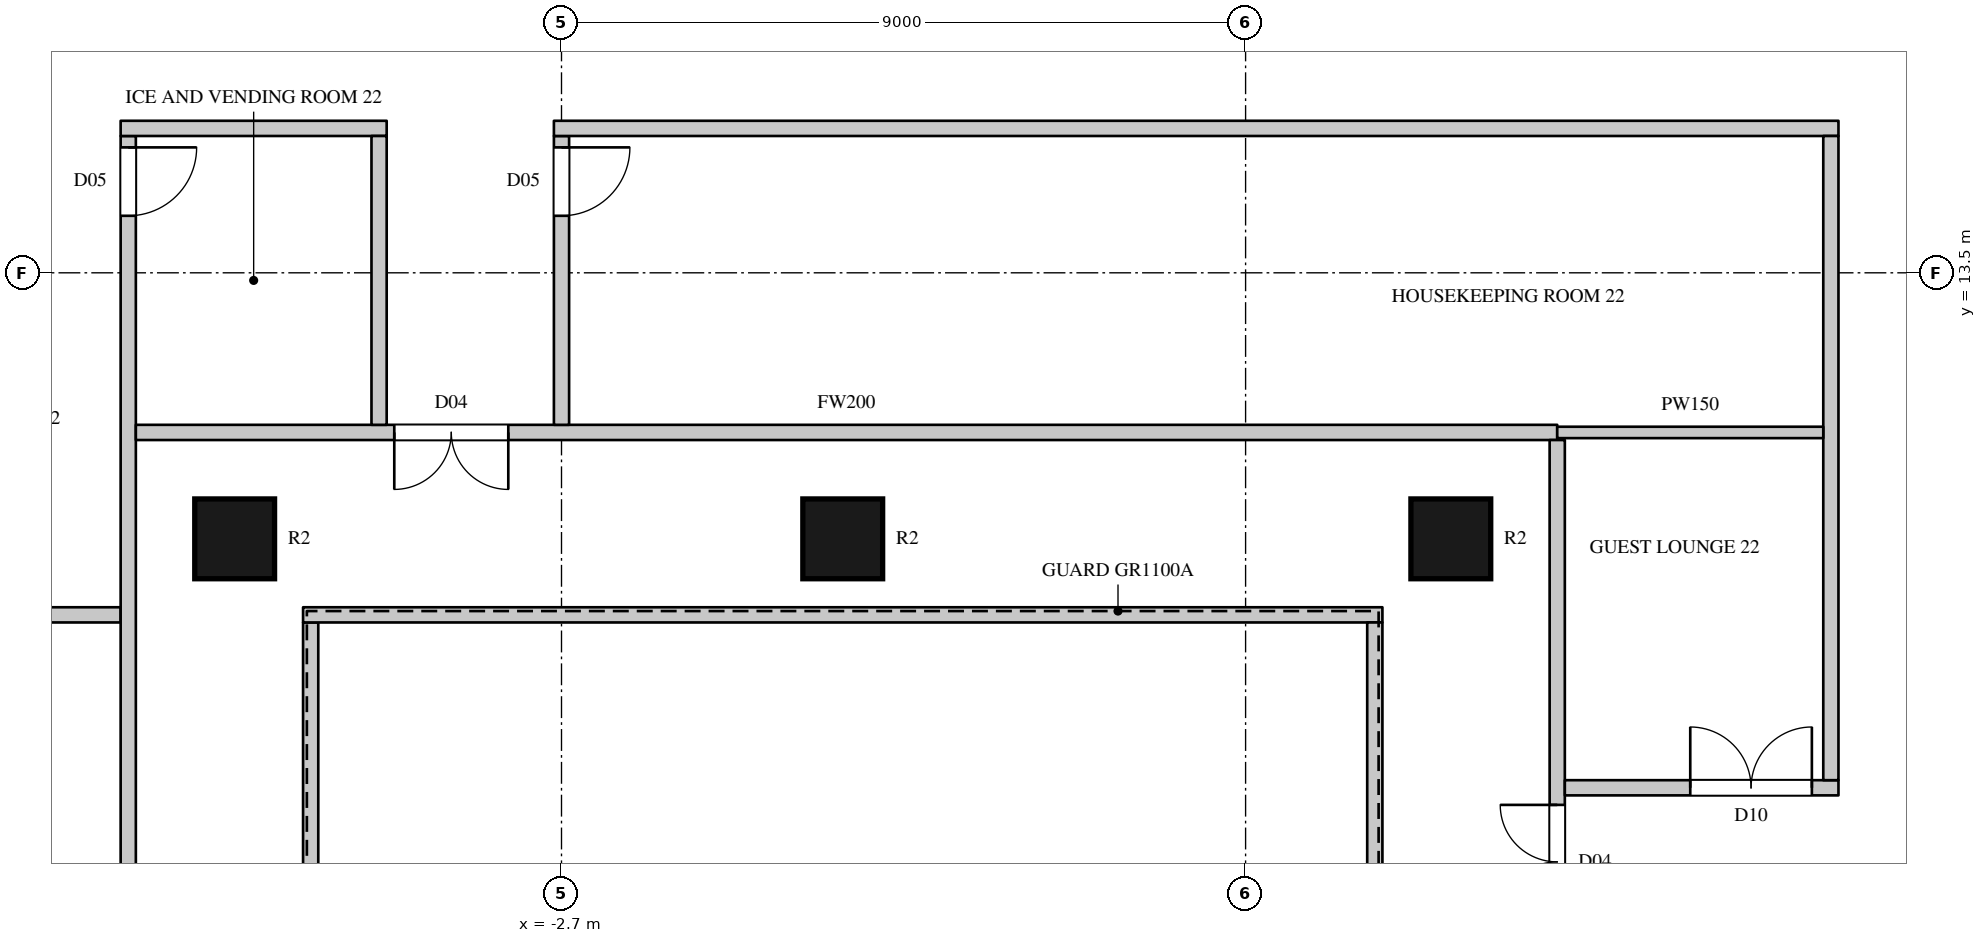
"""IFC4 building model, lengths in metres.
Left out: names, types, materials, properties, quantities, classifications, styles, units other than length and angle.
Written with IfcOpenShell. Run it as: python <this file> out.ifc"""

import sys

from ifc_helpers import new_model, si_unit, direction, frame, frame_2d, origin, origin_2d, place, context, subcontext, project, spatial, rectangle, circle, extrude, element, fill, save


model = new_model("IFC4")
c1 = context("Model", 3, precision=1e-05, world=origin(), true_north=direction((0.0, 1.0)))
c2 = subcontext(c1, "Body", "Model", "MODEL_VIEW")
j1 = project(units=[si_unit("LENGTHUNIT", "METRE"), si_unit("PLANEANGLEUNIT", "RADIAN")], contexts=[c1])
p1 = place(None, origin())
s1 = spatial("IfcSite", under=j1, at=p1, CompositionType="ELEMENT")
p2 = place(p1, origin())
s2 = spatial("IfcBuilding", under=s1, at=p2, CompositionType="ELEMENT")
p3 = place(p2, frame((0.0, 0.0, 109.5)))
s3 = spatial("IfcBuildingStorey", under=s2, at=p3, CompositionType="ELEMENT", Elevation=109.5)
for number, where, z_axis, x_axis in (
    (1, (-7.0, 10.0, 0.0), (0.0, 0.0, 1.0), (1.0, 0.0, 0.0)),
    (2, (1.0, 10.0, 0.0), (0.0, 0.0, 1.0), (1.0, 0.0, 0.0)),
    (3, (9.0, 10.0, 0.0), (0.0, 0.0, 1.0), (1.0, 0.0, 0.0)),
):
    element("IfcColumn", number, at=place(p3, frame(where, z_axis=z_axis, x_axis=x_axis)), inside=s3, PredefinedType="COLUMN", context=c2, shape_type="SweptSolid", body=[
        extrude(circle(Radius=0.525, at=origin_2d()), origin(), (0.0, 0.0, 1.0), 3.6),
    ])
p4 = place(p3, frame((-13.97, 9.0, 0.0), z_axis=(0.0, 0.0, 1.0), x_axis=(1.0, 0.0, 0.0)))
e4 = element("IfcWall", 4, at=p4, inside=s3, PredefinedType="PARTITIONING", context=c2, shape_type="SweptSolid", body=[
    extrude(rectangle(XDim=5.47, YDim=0.2, at=frame_2d((2.735, 0.0))), origin(), (0.0, 0.0, 1.0), 3.3),
])
p5 = place(p3, frame((-8.4, -11.3, 0.0), z_axis=(0.0, 0.0, 1.0), x_axis=(0.0, 1.0, 0.0)))
e5 = element("IfcWall", 5, at=p5, inside=s3, PredefinedType="PARTITIONING", context=c2, shape_type="SweptSolid", body=[
    extrude(rectangle(XDim=26.6, YDim=0.2, at=frame_2d((13.3, 0.0))), origin(), (0.0, 0.0, 1.0), 3.3),
])
p6 = place(p5, frame((15.05, 0.0, 0.0)))
e6 = element("IfcOpeningElement", 6, at=p6, cuts=e5, PredefinedType="OPENING", context=c2, shape_type="SweptSolid", body=[
    extrude(rectangle(XDim=1.5, YDim=2.2, at=frame_2d((0.75, 1.1))), frame((0.0, 0.11, 0.0), z_axis=(0.0, -1.0, 0.0), x_axis=(1.0, 0.0, 0.0)), (0.0, 0.0, 1.0), 0.22),
])
p7 = place(p5, frame((25.55, 0.0, 0.0)))
e7 = element("IfcOpeningElement", 7, at=p7, cuts=e5, PredefinedType="OPENING", context=c2, shape_type="SweptSolid", body=[
    extrude(rectangle(XDim=0.9, YDim=2.2, at=frame_2d((0.45, 1.1))), frame((0.0, 0.11, 0.0), z_axis=(0.0, -1.0, 0.0), x_axis=(1.0, 0.0, 0.0)), (0.0, 0.0, 1.0), 0.22),
])
p8 = place(p3, frame((-8.3, 11.4, 0.0), z_axis=(0.0, 0.0, 1.0), x_axis=(1.0, 0.0, 0.0)))
e8 = element("IfcWall", 8, at=p8, inside=s3, PredefinedType="PARTITIONING", context=c2, shape_type="SweptSolid", body=[
    extrude(rectangle(XDim=18.7, YDim=0.2, at=frame_2d((9.35, 0.0))), origin(), (0.0, 0.0, 1.0), 3.3),
])
p9 = place(p8, frame((3.4, 0.0, 0.0)))
e9 = element("IfcOpeningElement", 9, at=p9, cuts=e8, PredefinedType="OPENING", context=c2, shape_type="SweptSolid", body=[
    extrude(rectangle(XDim=1.5, YDim=2.2, at=frame_2d((0.75, 1.1))), frame((0.0, 0.11, 0.0), z_axis=(0.0, -1.0, 0.0), x_axis=(1.0, 0.0, 0.0)), (0.0, 0.0, 1.0), 0.22),
])
p10 = place(p3, frame((-8.5, 15.4, 0.0), z_axis=(0.0, 0.0, 1.0), x_axis=(1.0, 0.0, 0.0)))
e10 = element("IfcWall", 10, at=p10, inside=s3, PredefinedType="PARTITIONING", context=c2, shape_type="SweptSolid", body=[
    extrude(rectangle(XDim=3.5, YDim=0.2, at=frame_2d((1.75, 0.0))), origin(), (0.0, 0.0, 1.0), 3.3),
])
p11 = place(p3, frame((-6.0, -8.9, 0.0), z_axis=(0.0, 0.0, 1.0), x_axis=(0.0, 1.0, 0.0)))
e11 = element("IfcWall", 11, at=p11, inside=s3, PredefinedType="PARTITIONING", context=c2, shape_type="SweptSolid", body=[
    extrude(rectangle(XDim=17.8, YDim=0.2, at=frame_2d((8.9, 0.0))), origin(), (0.0, 0.0, 1.0), 3.3),
])
p12 = place(p3, frame((-6.1, 9.0, 0.0), z_axis=(0.0, 0.0, 1.0), x_axis=(1.0, 0.0, 0.0)))
e12 = element("IfcWall", 12, at=p12, inside=s3, PredefinedType="PARTITIONING", context=c2, shape_type="SweptSolid", body=[
    extrude(rectangle(XDim=14.2, YDim=0.2, at=frame_2d((7.1, 0.0))), origin(), (0.0, 0.0, 1.0), 3.3),
])
p13 = place(p3, frame((-5.1, 11.5, 0.0), z_axis=(0.0, 0.0, 1.0), x_axis=(0.0, 1.0, 0.0)))
e13 = element("IfcWall", 13, at=p13, inside=s3, PredefinedType="PARTITIONING", context=c2, shape_type="SweptSolid", body=[
    extrude(rectangle(XDim=3.8, YDim=0.2, at=frame_2d((1.9, 0.0))), origin(), (0.0, 0.0, 1.0), 3.3),
])
p14 = place(p3, frame((-2.7, 11.5, 0.0), z_axis=(0.0, 0.0, 1.0), x_axis=(0.0, 1.0, 0.0)))
e14 = element("IfcWall", 14, at=p14, inside=s3, PredefinedType="PARTITIONING", context=c2, shape_type="SweptSolid", body=[
    extrude(rectangle(XDim=3.8, YDim=0.2, at=frame_2d((1.9, 0.0))), origin(), (0.0, 0.0, 1.0), 2.75),
])
p15 = place(p14, frame((2.75, 0.0, 0.0)))
e15 = element("IfcOpeningElement", 15, at=p15, cuts=e14, PredefinedType="OPENING", context=c2, shape_type="SweptSolid", body=[
    extrude(rectangle(XDim=0.9, YDim=2.2, at=frame_2d((0.45, 1.1))), frame((0.0, 0.11, 0.0), z_axis=(0.0, -1.0, 0.0), x_axis=(1.0, 0.0, 0.0)), (0.0, 0.0, 1.0), 0.22),
])
p16 = place(p3, frame((-2.8, 15.4, 0.0), z_axis=(0.0, 0.0, 1.0), x_axis=(1.0, 0.0, 0.0)))
e16 = element("IfcWall", 16, at=p16, inside=s3, PredefinedType="PARTITIONING", context=c2, shape_type="SweptSolid", body=[
    extrude(rectangle(XDim=16.9, YDim=0.2, at=frame_2d((8.45, 0.0))), origin(), (0.0, 0.0, 1.0), 3.3),
])
p17 = place(p3, frame((8.0, -8.9, 0.0), z_axis=(0.0, 0.0, 1.0), x_axis=(0.0, 1.0, 0.0)))
e17 = element("IfcWall", 17, at=p17, inside=s3, PredefinedType="PARTITIONING", context=c2, shape_type="SweptSolid", body=[
    extrude(rectangle(XDim=17.8, YDim=0.2, at=frame_2d((8.9, 0.0))), origin(), (0.0, 0.0, 1.0), 3.3),
])
p18 = place(p3, frame((10.4, -11.3, 0.0), z_axis=(0.0, 0.0, 1.0), x_axis=(0.0, 1.0, 0.0)))
e18 = element("IfcWall", 18, at=p18, inside=s3, PredefinedType="PARTITIONING", context=c2, shape_type="SweptSolid", body=[
    extrude(rectangle(XDim=22.6, YDim=0.2, at=frame_2d((11.3, 0.0))), origin(), (0.0, 0.0, 1.0), 3.3),
])
p19 = place(p18, frame((16.3, 0.0, 0.0)))
e19 = element("IfcOpeningElement", 19, at=p19, cuts=e18, PredefinedType="OPENING", context=c2, shape_type="SweptSolid", body=[
    extrude(rectangle(XDim=1.5, YDim=2.2, at=frame_2d((0.75, 1.1))), frame((0.0, 0.11, 0.0), z_axis=(0.0, -1.0, 0.0), x_axis=(1.0, 0.0, 0.0)), (0.0, 0.0, 1.0), 0.22),
])
p20 = place(p18, frame((14.65, 0.0, 0.0)))
e20 = element("IfcOpeningElement", 20, at=p20, cuts=e18, PredefinedType="OPENING", context=c2, shape_type="SweptSolid", body=[
    extrude(rectangle(XDim=1.5, YDim=2.2, at=frame_2d((0.75, 1.1))), frame((0.0, 0.11, 0.0), z_axis=(0.0, -1.0, 0.0), x_axis=(1.0, 0.0, 0.0)), (0.0, 0.0, 1.0), 0.22),
])
p21 = place(p18, frame((11.95, 0.0, 0.0)))
e21 = element("IfcOpeningElement", 21, at=p21, cuts=e18, PredefinedType="OPENING", context=c2, shape_type="SweptSolid", body=[
    extrude(rectangle(XDim=1.5, YDim=2.2, at=frame_2d((0.75, 1.1))), frame((0.0, 0.11, 0.0), z_axis=(0.0, -1.0, 0.0), x_axis=(1.0, 0.0, 0.0)), (0.0, 0.0, 1.0), 0.22),
])
p22 = place(p3, frame((10.5, 6.725, 0.0), z_axis=(0.0, 0.0, 1.0), x_axis=(1.0, 0.0, 0.0)))
e22 = element("IfcWall", 22, at=p22, inside=s3, PredefinedType="PARTITIONING", context=c2, shape_type="SweptSolid", body=[
    extrude(rectangle(XDim=3.6, YDim=0.2, at=frame_2d((1.8, 0.0))), origin(), (0.0, 0.0, 1.0), 3.3),
])
p23 = place(p22, frame((1.65, 0.0, 0.0)))
e23 = element("IfcOpeningElement", 23, at=p23, cuts=e22, PredefinedType="OPENING", context=c2, shape_type="SweptSolid", body=[
    extrude(rectangle(XDim=1.6, YDim=2.4, at=frame_2d((0.8, 1.2))), frame((0.0, 0.11, 0.0), z_axis=(0.0, -1.0, 0.0), x_axis=(1.0, 0.0, 0.0)), (0.0, 0.0, 1.0), 0.22),
])
p24 = place(p3, frame((14.0, 6.825, 0.0), z_axis=(0.0, 0.0, 1.0), x_axis=(0.0, 1.0, 0.0)))
e24 = element("IfcWall", 24, at=p24, inside=s3, PredefinedType="PARTITIONING", context=c2, shape_type="SweptSolid", body=[
    extrude(rectangle(XDim=8.475, YDim=0.2, at=frame_2d((4.238, 0.0))), origin(), (0.0, 0.0, 1.0), 3.3),
])
p25 = place(p3, frame((10.4, 11.4, 0.0), z_axis=(0.0, 0.0, 1.0), x_axis=(1.0, 0.0, 0.0)))
e25 = element("IfcWall", 25, at=p25, inside=s3, PredefinedType="PARTITIONING", context=c2, shape_type="SweptSolid", body=[
    extrude(rectangle(XDim=3.5, YDim=0.15, at=frame_2d((1.75, 0.0))), origin(), (0.0, 0.0, 1.0), 3.3),
])
p26 = place(p9, origin())
e26 = element("IfcDoor", 26, at=p26, inside=s3, OperationType="DOUBLE_DOOR_SINGLE_SWING", PredefinedType="DOOR", context=c2, shape_type="SweptSolid", body=[
    extrude(rectangle(XDim=1.5, YDim=2.2, at=frame_2d((0.75, 1.1))), frame((0.0, 0.025, 0.0), z_axis=(0.0, -1.0, 0.0), x_axis=(1.0, 0.0, 0.0)), (0.0, 0.0, 1.0), 0.05),
])
fill(e9, e26)
p27 = place(p19, origin())
e27 = element("IfcDoor", 27, at=p27, inside=s3, OperationType="DOUBLE_DOOR_SINGLE_SWING", PredefinedType="DOOR", context=c2, shape_type="SweptSolid", body=[
    extrude(rectangle(XDim=1.5, YDim=2.2, at=frame_2d((0.75, 1.1))), frame((0.0, 0.025, 0.0), z_axis=(0.0, -1.0, 0.0), x_axis=(1.0, 0.0, 0.0)), (0.0, 0.0, 1.0), 0.05),
])
fill(e19, e27)
p28 = place(p7, origin())
e28 = element("IfcDoor", 28, at=p28, inside=s3, OperationType="SINGLE_SWING_LEFT", PredefinedType="DOOR", context=c2, shape_type="SweptSolid", body=[
    extrude(rectangle(XDim=0.9, YDim=2.2, at=frame_2d((0.45, 1.1))), frame((0.0, 0.025, 0.0), z_axis=(0.0, -1.0, 0.0), x_axis=(1.0, 0.0, 0.0)), (0.0, 0.0, 1.0), 0.05),
])
fill(e7, e28)
p29 = place(p15, origin())
e29 = element("IfcDoor", 29, at=p29, inside=s3, OperationType="SINGLE_SWING_LEFT", PredefinedType="DOOR", context=c2, shape_type="SweptSolid", body=[
    extrude(rectangle(XDim=0.9, YDim=2.2, at=frame_2d((0.45, 1.1))), frame((0.0, 0.025, 0.0), z_axis=(0.0, -1.0, 0.0), x_axis=(1.0, 0.0, 0.0)), (0.0, 0.0, 1.0), 0.05),
])
fill(e15, e29)
p30 = place(p23, origin())
e30 = element("IfcDoor", 30, at=p30, inside=s3, OperationType="DOUBLE_DOOR_SINGLE_SWING", PredefinedType="DOOR", context=c2, shape_type="SweptSolid", body=[
    extrude(rectangle(XDim=1.6, YDim=2.4, at=frame_2d((0.8, 1.2))), frame((0.0, 0.025, 0.0), z_axis=(0.0, -1.0, 0.0), x_axis=(1.0, 0.0, 0.0)), (0.0, 0.0, 1.0), 0.05),
])
fill(e23, e30)
save(model, sys.argv[1])
